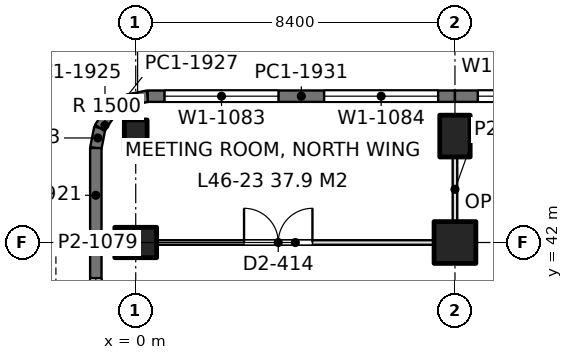
"""IFC4 building model, lengths in metres.
Left out: names, types, materials, properties, quantities, classifications, styles, units other than length and angle.
Written with IfcOpenShell. Run it as: python <this file> out.ifc"""

import sys

from ifc_helpers import new_model, si_unit, direction, frame, frame_2d, origin, origin_2d, place, context, subcontext, project, spatial, rectangle, extrude, element, fill, save


model = new_model("IFC4")
c1 = context("Model", 3, precision=1e-05, world=origin(), true_north=direction((0.0, 1.0)))
c2 = subcontext(c1, "Body", "Model", "MODEL_VIEW")
j1 = project(units=[si_unit("LENGTHUNIT", "METRE"), si_unit("PLANEANGLEUNIT", "RADIAN")], contexts=[c1])
p1 = place(None, origin())
s1 = spatial("IfcSite", under=j1, at=p1, CompositionType="ELEMENT")
p2 = place(p1, origin())
s2 = spatial("IfcBuilding", under=s1, at=p2, CompositionType="ELEMENT")
p3 = place(p2, frame((0.0, 0.0, 202.8)))
s3 = spatial("IfcBuildingStorey", under=s2, at=p3, CompositionType="ELEMENT", Elevation=202.8)
p4 = place(p3, frame((0.0, 42.0, 0.0), z_axis=(0.0, 0.0, 1.0), x_axis=(0.0, 1.0, 0.0)))
e1 = element("IfcColumn", 1, at=p4, inside=s3, PredefinedType="COLUMN", context=c2, shape_type="SweptSolid", body=[
    extrude(rectangle(XDim=0.8, YDim=1.1, at=origin_2d()), origin(), (0.0, 0.0, 1.0), 4.2),
])
p5 = place(p3, frame((0.0, 44.8, 0.0), z_axis=(0.0, 0.0, 1.0), x_axis=(1.0, 0.0, 0.0)))
e2 = element("IfcColumn", 2, at=p5, inside=s3, PredefinedType="COLUMN", context=c2, shape_type="SweptSolid", body=[
    extrude(rectangle(XDim=0.6, YDim=0.85, at=origin_2d()), origin(), (0.0, 0.0, 1.0), 4.2),
])
p6 = place(p3, frame((8.4, 42.0, 0.0), z_axis=(0.0, 0.0, 1.0), x_axis=(1.0, 0.0, 0.0)))
e3 = element("IfcColumn", 3, at=p6, inside=s3, PredefinedType="COLUMN", context=c2, shape_type="SweptSolid", body=[
    extrude(rectangle(XDim=1.1, YDim=1.1, at=origin_2d()), origin(), (0.0, 0.0, 1.0), 4.2),
])
p7 = place(p3, frame((8.4, 44.8, 0.0), z_axis=(0.0, 0.0, 1.0), x_axis=(1.0, 0.0, 0.0)))
e4 = element("IfcColumn", 4, at=p7, inside=s3, PredefinedType="COLUMN", context=c2, shape_type="SweptSolid", body=[
    extrude(rectangle(XDim=0.8, YDim=1.1, at=origin_2d()), origin(), (0.0, 0.0, 1.0), 4.2),
])
p8 = place(p3, frame((-1.05, 37.725, 0.0), z_axis=(0.0, 0.0, 1.0), x_axis=(0.0, 1.0, 0.0)))
e5 = element("IfcWall", 5, at=p8, inside=s3, PredefinedType="SOLIDWALL", context=c2, shape_type="SweptSolid", body=[
    extrude(rectangle(XDim=4.275, YDim=0.3, at=frame_2d((2.137, 0.0))), origin(), (0.0, 0.0, 1.0), 4.05),
])
p9 = place(p8, frame((0.938, 0.0, 0.9)))
e6 = element("IfcOpeningElement", 6, at=p9, cuts=e5, PredefinedType="OPENING", context=c2, shape_type="SweptSolid", body=[
    extrude(rectangle(XDim=2.4, YDim=1.9, at=frame_2d((1.2, 0.95))), frame((0.0, 0.16, 0.0), z_axis=(0.0, -1.0, 0.0), x_axis=(1.0, 0.0, 0.0)), (0.0, 0.0, 1.0), 0.32),
])
p10 = place(p3, frame((-1.05, 42.0, 0.0), z_axis=(0.0, 0.0, 1.0), x_axis=(0.0, 1.0, 0.0)))
e7 = element("IfcWall", 7, at=p10, inside=s3, PredefinedType="SOLIDWALL", context=c2, shape_type="SweptSolid", body=[
    extrude(rectangle(XDim=2.485, YDim=0.3, at=frame_2d((1.243, 0.0))), origin(), (0.0, 0.0, 1.0), 4.05),
])
p11 = place(p3, frame((-1.05, 44.485, 0.0), z_axis=(0.0, 0.0, 1.0), x_axis=(0.195073962632, 0.980788534345, 0.0)))
e8 = element("IfcWall", 8, at=p11, inside=s3, PredefinedType="SOLIDWALL", context=c2, shape_type="SweptSolid", body=[
    extrude(rectangle(XDim=0.541, YDim=0.3, at=frame_2d((0.271, 0.0))), origin(), (0.0, 0.0, 1.0), 4.05),
])
p12 = place(p3, frame((-0.945, 45.015, 0.0), z_axis=(0.0, 0.0, 1.0), x_axis=(0.55534295404, 0.831621430339, 0.0)))
e9 = element("IfcWall", 9, at=p12, inside=s3, PredefinedType="SOLIDWALL", context=c2, shape_type="SweptSolid", body=[
    extrude(rectangle(XDim=0.526, YDim=0.3, at=frame_2d((0.263, 0.0))), origin(), (0.0, 0.0, 1.0), 4.05),
])
p13 = place(p3, frame((-0.653, 45.453, 0.0), z_axis=(0.0, 0.0, 1.0), x_axis=(0.831692711774, 0.555236195849, 0.0)))
e10 = element("IfcWall", 10, at=p13, inside=s3, PredefinedType="SOLIDWALL", context=c2, shape_type="SweptSolid", body=[
    extrude(rectangle(XDim=0.525, YDim=0.3, at=frame_2d((0.263, 0.0))), origin(), (0.0, 0.0, 1.0), 4.05),
])
p14 = place(p3, frame((-0.216, 45.744, 0.0), z_axis=(0.0, 0.0, 1.0), x_axis=(0.980702050465, 0.1955082817, 0.0)))
e11 = element("IfcWall", 11, at=p14, inside=s3, PredefinedType="SOLIDWALL", context=c2, shape_type="SweptSolid", body=[
    extrude(rectangle(XDim=0.541, YDim=0.3, at=frame_2d((0.271, 0.0))), origin(), (0.0, 0.0, 1.0), 4.05),
])
p15 = place(p3, frame((0.315, 45.85, 0.0), z_axis=(0.0, 0.0, 1.0), x_axis=(1.0, 0.0, 0.0)))
e12 = element("IfcWall", 12, at=p15, inside=s3, PredefinedType="SOLIDWALL", context=c2, shape_type="SweptSolid", body=[
    extrude(rectangle(XDim=8.085, YDim=0.3, at=frame_2d((4.042, 0.0))), origin(), (0.0, 0.0, 1.0), 4.05),
])
p16 = place(p15, frame((0.443, 0.0, 0.9)))
e13 = element("IfcOpeningElement", 13, at=p16, cuts=e12, PredefinedType="OPENING", context=c2, shape_type="SweptSolid", body=[
    extrude(rectangle(XDim=3.0, YDim=1.9, at=frame_2d((1.5, 0.95))), frame((0.0, 0.16, 0.0), z_axis=(0.0, -1.0, 0.0), x_axis=(1.0, 0.0, 0.0)), (0.0, 0.0, 1.0), 0.32),
])
p17 = place(p15, frame((4.643, 0.0, 0.9)))
e14 = element("IfcOpeningElement", 14, at=p17, cuts=e12, PredefinedType="OPENING", context=c2, shape_type="SweptSolid", body=[
    extrude(rectangle(XDim=3.0, YDim=1.9, at=frame_2d((1.5, 0.95))), frame((0.0, 0.16, 0.0), z_axis=(0.0, -1.0, 0.0), x_axis=(1.0, 0.0, 0.0)), (0.0, 0.0, 1.0), 0.32),
])
p18 = place(p3, frame((8.4, 45.85, 0.0), z_axis=(0.0, 0.0, 1.0), x_axis=(1.0, 0.0, 0.0)))
e15 = element("IfcWall", 15, at=p18, inside=s3, PredefinedType="SOLIDWALL", context=c2, shape_type="SweptSolid", body=[
    extrude(rectangle(XDim=8.4, YDim=0.3, at=frame_2d((4.2, 0.0))), origin(), (0.0, 0.0, 1.0), 4.05),
])
p19 = place(p18, frame((0.6, 0.0, 0.9)))
e16 = element("IfcOpeningElement", 16, at=p19, cuts=e15, PredefinedType="OPENING", context=c2, shape_type="SweptSolid", body=[
    extrude(rectangle(XDim=3.0, YDim=1.9, at=frame_2d((1.5, 0.95))), frame((0.0, 0.16, 0.0), z_axis=(0.0, -1.0, 0.0), x_axis=(1.0, 0.0, 0.0)), (0.0, 0.0, 1.0), 0.32),
])
p20 = place(p18, frame((4.8, 0.0, 0.9)))
e17 = element("IfcOpeningElement", 17, at=p20, cuts=e15, PredefinedType="OPENING", context=c2, shape_type="SweptSolid", body=[
    extrude(rectangle(XDim=3.0, YDim=1.9, at=frame_2d((1.5, 0.95))), frame((0.0, 0.16, 0.0), z_axis=(0.0, -1.0, 0.0), x_axis=(1.0, 0.0, 0.0)), (0.0, 0.0, 1.0), 0.32),
])
p21 = place(p3, frame((0.549, 42.0, 0.0), z_axis=(0.0, 0.0, 1.0), x_axis=(1.0, 0.0, 0.0)))
e18 = element("IfcWall", 18, at=p21, inside=s3, PredefinedType="PARTITIONING", context=c2, shape_type="SweptSolid", body=[
    extrude(rectangle(XDim=7.302, YDim=0.12, at=frame_2d((3.651, 0.0))), origin(), (0.0, 0.0, 1.0), 3.55),
])
p22 = place(p21, frame((2.301, 0.0, 0.0)))
e19 = element("IfcOpeningElement", 19, at=p22, cuts=e18, PredefinedType="OPENING", context=c2, shape_type="SweptSolid", body=[
    extrude(rectangle(XDim=1.8, YDim=2.2, at=frame_2d((0.9, 1.1))), frame((0.0, 0.07, 0.0), z_axis=(0.0, -1.0, 0.0), x_axis=(1.0, 0.0, 0.0)), (0.0, 0.0, 1.0), 0.14),
])
p23 = place(p3, frame((8.4, 42.549, 0.0), z_axis=(0.0, 0.0, 1.0), x_axis=(0.0, 1.0, 0.0)))
e20 = element("IfcWall", 20, at=p23, inside=s3, PredefinedType="PARTITIONING", context=c2, shape_type="SweptSolid", body=[
    extrude(rectangle(XDim=1.702, YDim=0.12, at=frame_2d((0.851, 0.0))), origin(), (0.0, 0.0, 1.0), 3.69),
])
p24 = place(p9, origin())
e21 = element("IfcWindow", 21, at=p24, inside=s3, PartitioningType="SINGLE_PANEL", PredefinedType="WINDOW", context=c2, shape_type="SweptSolid", body=[
    extrude(rectangle(XDim=2.4, YDim=1.9, at=frame_2d((1.2, 0.95))), frame((0.0, 0.03, 0.0), z_axis=(0.0, -1.0, 0.0), x_axis=(1.0, 0.0, 0.0)), (0.0, 0.0, 1.0), 0.06),
])
fill(e6, e21)
p25 = place(p16, origin())
e22 = element("IfcWindow", 22, at=p25, inside=s3, PartitioningType="SINGLE_PANEL", PredefinedType="WINDOW", context=c2, shape_type="SweptSolid", body=[
    extrude(rectangle(XDim=3.0, YDim=1.9, at=frame_2d((1.5, 0.95))), frame((0.0, 0.03, 0.0), z_axis=(0.0, -1.0, 0.0), x_axis=(1.0, 0.0, 0.0)), (0.0, 0.0, 1.0), 0.06),
])
fill(e13, e22)
p26 = place(p17, origin())
e23 = element("IfcWindow", 23, at=p26, inside=s3, PartitioningType="SINGLE_PANEL", PredefinedType="WINDOW", context=c2, shape_type="SweptSolid", body=[
    extrude(rectangle(XDim=3.0, YDim=1.9, at=frame_2d((1.5, 0.95))), frame((0.0, 0.03, 0.0), z_axis=(0.0, -1.0, 0.0), x_axis=(1.0, 0.0, 0.0)), (0.0, 0.0, 1.0), 0.06),
])
fill(e14, e23)
p27 = place(p19, origin())
e24 = element("IfcWindow", 24, at=p27, inside=s3, PartitioningType="SINGLE_PANEL", PredefinedType="WINDOW", context=c2, shape_type="SweptSolid", body=[
    extrude(rectangle(XDim=3.0, YDim=1.9, at=frame_2d((1.5, 0.95))), frame((0.0, 0.03, 0.0), z_axis=(0.0, -1.0, 0.0), x_axis=(1.0, 0.0, 0.0)), (0.0, 0.0, 1.0), 0.06),
])
fill(e16, e24)
p28 = place(p22, origin())
e25 = element("IfcDoor", 25, at=p28, inside=s3, OperationType="DOUBLE_DOOR_SINGLE_SWING", PredefinedType="DOOR", context=c2, shape_type="SweptSolid", body=[
    extrude(rectangle(XDim=1.8, YDim=2.2, at=frame_2d((0.9, 1.1))), frame((0.0, 0.025, 0.0), z_axis=(0.0, -1.0, 0.0), x_axis=(1.0, 0.0, 0.0)), (0.0, 0.0, 1.0), 0.05),
])
fill(e19, e25)
save(model, sys.argv[1])
